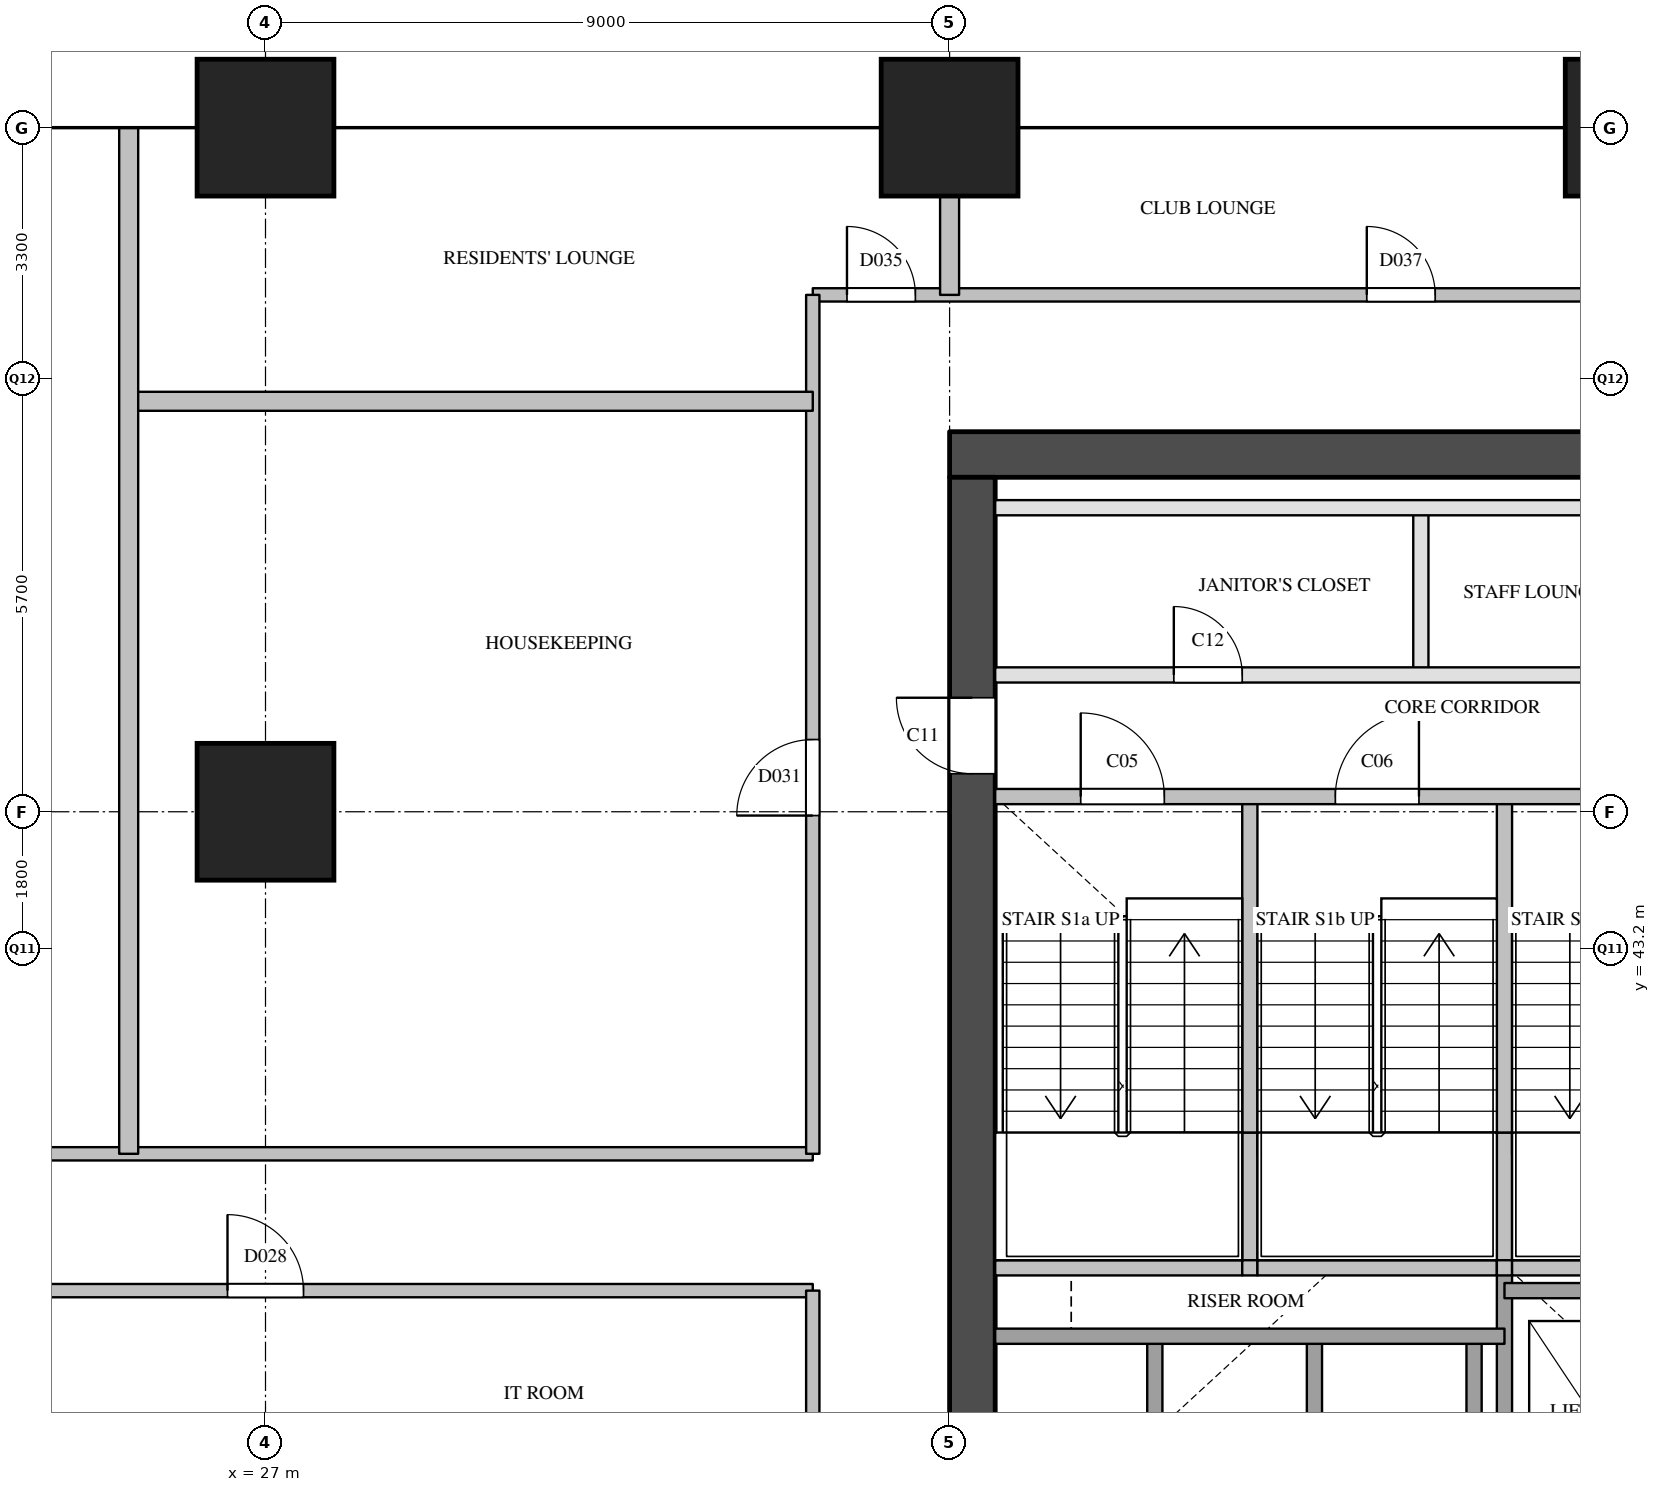
"""IFC4 building model, lengths in metres.
Left out: names, types, materials, properties, quantities, classifications, styles, units other than length and angle.
Written with IfcOpenShell. Run it as: python <this file> out.ifc"""

import sys

from ifc_helpers import new_model, si_unit, direction, frame, frame_2d, origin, origin_2d, place, context, subcontext, project, spatial, rectangle, extrude, element, fill, save


model = new_model("IFC4")
c1 = context("Model", 3, precision=1e-05, world=origin(), true_north=direction((0.0, 1.0)))
c2 = subcontext(c1, "Body", "Model", "MODEL_VIEW")
j1 = project(units=[si_unit("LENGTHUNIT", "METRE"), si_unit("PLANEANGLEUNIT", "RADIAN")], contexts=[c1])
p1 = place(None, origin())
s1 = spatial("IfcSite", under=j1, at=p1, CompositionType="ELEMENT")
p2 = place(p1, origin())
s2 = spatial("IfcBuilding", under=s1, at=p2, CompositionType="ELEMENT")
p3 = place(p2, frame((0.0, 0.0, 112.0)))
s3 = spatial("IfcBuildingStorey", under=s2, at=p3, CompositionType="ELEMENT", Elevation=112.0)
for number, where, z_axis, x_axis in (
    (1, (27.0, 45.0, 0.0), (0.0, 0.0, 1.0), (1.0, 0.0, 0.0)),
    (2, (27.0, 54.0, 0.0), (0.0, 0.0, 1.0), (1.0, 0.0, 0.0)),
    (3, (36.0, 54.0, 0.0), (0.0, 0.0, 1.0), (1.0, 0.0, 0.0)),
    (4, (45.0, 54.0, 0.0), (0.0, 0.0, 1.0), (1.0, 0.0, 0.0)),
):
    element("IfcColumn", number, at=place(p3, frame(where, z_axis=z_axis, x_axis=x_axis)), inside=s3, PredefinedType="COLUMN", context=c2, shape_type="SweptSolid", body=[
        extrude(rectangle(XDim=1.8, YDim=1.8, at=origin_2d()), origin(), (0.0, 0.0, 1.0), 3.8),
    ])
p4 = place(p3, frame((36.0, 49.7, 0.0), z_axis=(0.0, 0.0, 1.0), x_axis=(1.0, 0.0, 0.0)))
e5 = element("IfcWall", 5, at=p4, inside=s3, PredefinedType="SHEAR", context=c2, shape_type="SweptSolid", body=[
    extrude(rectangle(XDim=12.4, YDim=0.6, at=frame_2d((6.2, 0.0))), origin(), (0.0, 0.0, 1.0), 3.5),
])
p5 = place(p3, frame((36.3, 29.1, 0.0), z_axis=(0.0, 0.0, 1.0), x_axis=(0.0, 1.0, 0.0)))
e6 = element("IfcWall", 6, at=p5, inside=s3, PredefinedType="SHEAR", context=c2, shape_type="SweptSolid", body=[
    extrude(rectangle(XDim=20.3, YDim=0.6, at=frame_2d((10.15, 0.0))), origin(), (0.0, 0.0, 1.0), 3.5),
])
p6 = place(p5, frame((3.6, 0.0, 0.0)))
e7 = element("IfcOpeningElement", 7, at=p6, cuts=e6, PredefinedType="OPENING", context=c2, shape_type="SweptSolid", body=[
    extrude(rectangle(XDim=1.8, YDim=2.1, at=frame_2d((0.9, 1.05))), frame((0.0, 0.31, 0.0), z_axis=(0.0, -1.0, 0.0), x_axis=(1.0, 0.0, 0.0)), (0.0, 0.0, 1.0), 0.62),
])
p7 = place(p5, frame((16.4, 0.0, 0.0)))
e8 = element("IfcOpeningElement", 8, at=p7, cuts=e6, PredefinedType="OPENING", context=c2, shape_type="SweptSolid", body=[
    extrude(rectangle(XDim=1.0, YDim=2.1, at=frame_2d((0.5, 1.05))), frame((0.0, 0.31, 0.0), z_axis=(0.0, -1.0, 0.0), x_axis=(1.0, 0.0, 0.0)), (0.0, 0.0, 1.0), 0.62),
])
p8 = place(p3, frame((38.7, 34.9, 0.0), z_axis=(0.0, 0.0, 1.0), x_axis=(0.0, 1.0, 0.0)))
e9 = element("IfcWall", 9, at=p8, inside=s3, PredefinedType="SOLIDWALL", context=c2, shape_type="SweptSolid", body=[
    extrude(rectangle(XDim=3.2, YDim=0.2, at=frame_2d((1.6, 0.0))), origin(), (0.0, 0.0, 1.0), 3.5),
])
p9 = place(p3, frame((39.95, 39.0, 0.0), z_axis=(0.0, 0.0, 1.0), x_axis=(0.0, 1.0, 0.0)))
e10 = element("IfcWall", 10, at=p9, inside=s3, PredefinedType="SOLIDWALL", context=c2, shape_type="SweptSolid", body=[
    extrude(rectangle(XDim=1.78, YDim=0.2, at=frame_2d((0.89, 0.0))), origin(), (0.0, 0.0, 1.0), 3.5),
])
p10 = place(p3, frame((39.95, 40.78, 0.0), z_axis=(0.0, 0.0, 1.0), x_axis=(0.0, 1.0, 0.0)))
e11 = element("IfcWall", 11, at=p10, inside=s3, PredefinedType="SOLIDWALL", context=c2, shape_type="SweptSolid", body=[
    extrude(rectangle(XDim=4.42, YDim=0.2, at=frame_2d((2.21, 0.0))), origin(), (0.0, 0.0, 1.0), 3.5),
])
p11 = place(p3, frame((40.8, 34.9, 0.0), z_axis=(0.0, 0.0, 1.0), x_axis=(0.0, 1.0, 0.0)))
e12 = element("IfcWall", 12, at=p11, inside=s3, PredefinedType="SOLIDWALL", context=c2, shape_type="SweptSolid", body=[
    extrude(rectangle(XDim=3.2, YDim=0.2, at=frame_2d((1.6, 0.0))), origin(), (0.0, 0.0, 1.0), 3.5),
])
p12 = place(p3, frame((42.2, 46.8, 0.0), z_axis=(0.0, 0.0, 1.0), x_axis=(0.0, 1.0, 0.0)))
e13 = element("IfcWall", 13, at=p12, inside=s3, PredefinedType="PARTITIONING", context=c2, shape_type="SweptSolid", body=[
    extrude(rectangle(XDim=2.2, YDim=0.2, at=frame_2d((1.1, 0.0))), origin(), (0.0, 0.0, 1.0), 3.5),
])
p13 = place(p3, frame((42.9, 34.9, 0.0), z_axis=(0.0, 0.0, 1.0), x_axis=(0.0, 1.0, 0.0)))
e14 = element("IfcWall", 14, at=p13, inside=s3, PredefinedType="SOLIDWALL", context=c2, shape_type="SweptSolid", body=[
    extrude(rectangle(XDim=3.2, YDim=0.2, at=frame_2d((1.6, 0.0))), origin(), (0.0, 0.0, 1.0), 3.5),
])
p14 = place(p3, frame((43.3, 29.1, 0.0), z_axis=(0.0, 0.0, 1.0), x_axis=(0.0, 1.0, 0.0)))
e15 = element("IfcWall", 15, at=p14, inside=s3, PredefinedType="SOLIDWALL", context=c2, shape_type="SweptSolid", body=[
    extrude(rectangle(XDim=9.9, YDim=0.2, at=frame_2d((4.95, 0.0))), origin(), (0.0, 0.0, 1.0), 3.5),
])
p15 = place(p3, frame((43.3, 39.0, 0.0), z_axis=(0.0, 0.0, 1.0), x_axis=(0.0, 1.0, 0.0)))
e16 = element("IfcWall", 16, at=p15, inside=s3, PredefinedType="SOLIDWALL", context=c2, shape_type="SweptSolid", body=[
    extrude(rectangle(XDim=1.78, YDim=0.2, at=frame_2d((0.89, 0.0))), origin(), (0.0, 0.0, 1.0), 3.5),
])
p16 = place(p3, frame((43.3, 40.78, 0.0), z_axis=(0.0, 0.0, 1.0), x_axis=(0.0, 1.0, 0.0)))
e17 = element("IfcWall", 17, at=p16, inside=s3, PredefinedType="SOLIDWALL", context=c2, shape_type="SweptSolid", body=[
    extrude(rectangle(XDim=4.42, YDim=0.2, at=frame_2d((2.21, 0.0))), origin(), (0.0, 0.0, 1.0), 3.5),
])
p17 = place(p3, frame((36.6, 38.1, 0.0), z_axis=(0.0, 0.0, 1.0), x_axis=(1.0, 0.0, 0.0)))
e18 = element("IfcWall", 18, at=p17, inside=s3, PredefinedType="SOLIDWALL", context=c2, shape_type="SweptSolid", body=[
    extrude(rectangle(XDim=6.7, YDim=0.2, at=frame_2d((3.35, 0.0))), origin(), (0.0, 0.0, 1.0), 3.5),
])
p18 = place(p3, frame((43.3, 38.7, 0.0), z_axis=(0.0, 0.0, 1.0), x_axis=(1.0, 0.0, 0.0)))
e19 = element("IfcWall", 19, at=p18, inside=s3, PredefinedType="SOLIDWALL", context=c2, shape_type="SweptSolid", body=[
    extrude(rectangle(XDim=4.5, YDim=0.2, at=frame_2d((2.25, 0.0))), origin(), (0.0, 0.0, 1.0), 3.5),
])
p19 = place(p3, frame((36.6, 39.0, 0.0), z_axis=(0.0, 0.0, 1.0), x_axis=(1.0, 0.0, 0.0)))
e20 = element("IfcWall", 20, at=p19, inside=s3, PredefinedType="SOLIDWALL", context=c2, shape_type="SweptSolid", body=[
    extrude(rectangle(XDim=3.25, YDim=0.2, at=frame_2d((1.625, 0.0))), origin(), (0.0, 0.0, 1.0), 3.5),
])
p20 = place(p3, frame((39.85, 39.0, 0.0), z_axis=(0.0, 0.0, 1.0), x_axis=(1.0, 0.0, 0.0)))
e21 = element("IfcWall", 21, at=p20, inside=s3, PredefinedType="SOLIDWALL", context=c2, shape_type="SweptSolid", body=[
    extrude(rectangle(XDim=0.2, YDim=0.2, at=frame_2d((0.1, 0.0))), origin(), (0.0, 0.0, 1.0), 3.5),
])
p21 = place(p3, frame((40.05, 39.0, 0.0), z_axis=(0.0, 0.0, 1.0), x_axis=(1.0, 0.0, 0.0)))
e22 = element("IfcWall", 22, at=p21, inside=s3, PredefinedType="SOLIDWALL", context=c2, shape_type="SweptSolid", body=[
    extrude(rectangle(XDim=3.15, YDim=0.2, at=frame_2d((1.575, 0.0))), origin(), (0.0, 0.0, 1.0), 3.5),
])
p22 = place(p3, frame((43.2, 39.0, 0.0), z_axis=(0.0, 0.0, 1.0), x_axis=(1.0, 0.0, 0.0)))
e23 = element("IfcWall", 23, at=p22, inside=s3, PredefinedType="SOLIDWALL", context=c2, shape_type="SweptSolid", body=[
    extrude(rectangle(XDim=0.2, YDim=0.2, at=frame_2d((0.1, 0.0))), origin(), (0.0, 0.0, 1.0), 3.5),
])
p23 = place(p3, frame((43.4, 39.0, 0.0), z_axis=(0.0, 0.0, 1.0), x_axis=(1.0, 0.0, 0.0)))
e24 = element("IfcWall", 24, at=p23, inside=s3, PredefinedType="SOLIDWALL", context=c2, shape_type="SweptSolid", body=[
    extrude(rectangle(XDim=3.25, YDim=0.2, at=frame_2d((1.625, 0.0))), origin(), (0.0, 0.0, 1.0), 3.5),
])
p24 = place(p3, frame((36.6, 45.2, 0.0), z_axis=(0.0, 0.0, 1.0), x_axis=(1.0, 0.0, 0.0)))
e25 = element("IfcWall", 25, at=p24, inside=s3, PredefinedType="SOLIDWALL", context=c2, shape_type="SweptSolid", body=[
    extrude(rectangle(XDim=10.05, YDim=0.2, at=frame_2d((5.025, 0.0))), origin(), (0.0, 0.0, 1.0), 3.5),
])
p25 = place(p24, frame((1.125, 0.0, 0.0)))
e26 = element("IfcOpeningElement", 26, at=p25, cuts=e25, PredefinedType="OPENING", context=c2, shape_type="SweptSolid", body=[
    extrude(rectangle(XDim=1.1, YDim=2.1, at=frame_2d((0.55, 1.05))), frame((0.0, 0.11, 0.0), z_axis=(0.0, -1.0, 0.0), x_axis=(1.0, 0.0, 0.0)), (0.0, 0.0, 1.0), 0.22),
])
p26 = place(p24, frame((4.475, 0.0, 0.0)))
e27 = element("IfcOpeningElement", 27, at=p26, cuts=e25, PredefinedType="OPENING", context=c2, shape_type="SweptSolid", body=[
    extrude(rectangle(XDim=1.1, YDim=2.1, at=frame_2d((0.55, 1.05))), frame((0.0, 0.11, 0.0), z_axis=(0.0, -1.0, 0.0), x_axis=(1.0, 0.0, 0.0)), (0.0, 0.0, 1.0), 0.22),
])
p27 = place(p24, frame((7.825, 0.0, 0.0)))
e28 = element("IfcOpeningElement", 28, at=p27, cuts=e25, PredefinedType="OPENING", context=c2, shape_type="SweptSolid", body=[
    extrude(rectangle(XDim=1.1, YDim=2.1, at=frame_2d((0.55, 1.05))), frame((0.0, 0.11, 0.0), z_axis=(0.0, -1.0, 0.0), x_axis=(1.0, 0.0, 0.0)), (0.0, 0.0, 1.0), 0.22),
])
p28 = place(p3, frame((36.6, 46.8, 0.0), z_axis=(0.0, 0.0, 1.0), x_axis=(1.0, 0.0, 0.0)))
e29 = element("IfcWall", 29, at=p28, inside=s3, PredefinedType="PARTITIONING", context=c2, shape_type="SweptSolid", body=[
    extrude(rectangle(XDim=11.2, YDim=0.2, at=frame_2d((5.6, 0.0))), origin(), (0.0, 0.0, 1.0), 3.5),
])
p29 = place(p28, frame((2.35, 0.0, 0.0)))
e30 = element("IfcOpeningElement", 30, at=p29, cuts=e29, PredefinedType="OPENING", context=c2, shape_type="SweptSolid", body=[
    extrude(rectangle(XDim=0.9, YDim=2.1, at=frame_2d((0.45, 1.05))), frame((0.0, 0.11, 0.0), z_axis=(0.0, -1.0, 0.0), x_axis=(1.0, 0.0, 0.0)), (0.0, 0.0, 1.0), 0.22),
])
p30 = place(p28, frame((7.95, 0.0, 0.0)))
e31 = element("IfcOpeningElement", 31, at=p30, cuts=e29, PredefinedType="OPENING", context=c2, shape_type="SweptSolid", body=[
    extrude(rectangle(XDim=0.9, YDim=2.1, at=frame_2d((0.45, 1.05))), frame((0.0, 0.11, 0.0), z_axis=(0.0, -1.0, 0.0), x_axis=(1.0, 0.0, 0.0)), (0.0, 0.0, 1.0), 0.22),
])
p31 = place(p3, frame((36.6, 49.0, 0.0), z_axis=(0.0, 0.0, 1.0), x_axis=(1.0, 0.0, 0.0)))
e32 = element("IfcWall", 32, at=p31, inside=s3, PredefinedType="PARTITIONING", context=c2, shape_type="SweptSolid", body=[
    extrude(rectangle(XDim=11.2, YDim=0.2, at=frame_2d((5.6, 0.0))), origin(), (0.0, 0.0, 1.0), 3.5),
])
p32 = place(p3, frame((19.8, 38.7, 0.0), z_axis=(0.0, 0.0, 1.0), x_axis=(1.0, 0.0, 0.0)))
e33 = element("IfcWall", 33, at=p32, inside=s3, PredefinedType="PARTITIONING", context=c2, shape_type="SweptSolid", body=[
    extrude(rectangle(XDim=14.4, YDim=0.175, at=frame_2d((7.2, 0.0))), origin(), (0.0, 0.0, 1.0), 2.5),
])
p33 = place(p32, frame((6.7, 0.0, 0.0)))
e34 = element("IfcOpeningElement", 34, at=p33, cuts=e33, PredefinedType="OPENING", context=c2, shape_type="SweptSolid", body=[
    extrude(rectangle(XDim=1.0, YDim=2.1, at=frame_2d((0.5, 1.05))), frame((0.0, 0.097, 0.0), z_axis=(0.0, -1.0, 0.0), x_axis=(1.0, 0.0, 0.0)), (0.0, 0.0, 1.0), 0.195),
])
p34 = place(p3, frame((19.8, 40.5, 0.0), z_axis=(0.0, 0.0, 1.0), x_axis=(1.0, 0.0, 0.0)))
e35 = element("IfcWall", 35, at=p34, inside=s3, PredefinedType="PARTITIONING", context=c2, shape_type="SweptSolid", body=[
    extrude(rectangle(XDim=14.4, YDim=0.175, at=frame_2d((7.2, 0.0))), origin(), (0.0, 0.0, 1.0), 2.5),
])
p35 = place(p3, frame((34.2, 51.8, 0.0), z_axis=(0.0, 0.0, 1.0), x_axis=(1.0, 0.0, 0.0)))
e36 = element("IfcWall", 36, at=p35, inside=s3, PredefinedType="PARTITIONING", context=c2, shape_type="SweptSolid", body=[
    extrude(rectangle(XDim=16.0, YDim=0.175, at=frame_2d((8.0, 0.0))), origin(), (0.0, 0.0, 1.0), 3.5),
])
p36 = place(p35, frame((0.45, 0.0, 0.0)))
e37 = element("IfcOpeningElement", 37, at=p36, cuts=e36, PredefinedType="OPENING", context=c2, shape_type="SweptSolid", body=[
    extrude(rectangle(XDim=0.9, YDim=2.1, at=frame_2d((0.45, 1.05))), frame((0.0, 0.097, 0.0), z_axis=(0.0, -1.0, 0.0), x_axis=(1.0, 0.0, 0.0)), (0.0, 0.0, 1.0), 0.195),
])
p37 = place(p35, frame((7.289, 0.0, 0.0)))
e38 = element("IfcOpeningElement", 38, at=p37, cuts=e36, PredefinedType="OPENING", context=c2, shape_type="SweptSolid", body=[
    extrude(rectangle(XDim=0.9, YDim=2.1, at=frame_2d((0.45, 1.05))), frame((0.0, 0.097, 0.0), z_axis=(0.0, -1.0, 0.0), x_axis=(1.0, 0.0, 0.0)), (0.0, 0.0, 1.0), 0.195),
])
p38 = place(p3, frame((34.2, 29.12, 0.0), z_axis=(0.0, 0.0, 1.0), x_axis=(0.0, 1.0, 0.0)))
e39 = element("IfcWall", 39, at=p38, inside=s3, PredefinedType="PARTITIONING", context=c2, shape_type="SweptSolid", body=[
    extrude(rectangle(XDim=9.58, YDim=0.175, at=frame_2d((4.79, 0.0))), origin(), (0.0, 0.0, 1.0), 3.5),
])
p39 = place(p38, frame((2.94, 0.0, 0.0)))
e40 = element("IfcOpeningElement", 40, at=p39, cuts=e39, PredefinedType="OPENING", context=c2, shape_type="SweptSolid", body=[
    extrude(rectangle(XDim=1.0, YDim=2.1, at=frame_2d((0.5, 1.05))), frame((0.0, 0.097, 0.0), z_axis=(0.0, -1.0, 0.0), x_axis=(1.0, 0.0, 0.0)), (0.0, 0.0, 1.0), 0.195),
])
p40 = place(p3, frame((34.2, 40.5, 0.0), z_axis=(0.0, 0.0, 1.0), x_axis=(0.0, 1.0, 0.0)))
e41 = element("IfcWall", 41, at=p40, inside=s3, PredefinedType="PARTITIONING", context=c2, shape_type="SweptSolid", body=[
    extrude(rectangle(XDim=11.3, YDim=0.175, at=frame_2d((5.65, 0.0))), origin(), (0.0, 0.0, 1.0), 3.5),
])
p41 = place(p40, frame((4.45, 0.0, 0.0)))
e42 = element("IfcOpeningElement", 42, at=p41, cuts=e41, PredefinedType="OPENING", context=c2, shape_type="SweptSolid", body=[
    extrude(rectangle(XDim=1.0, YDim=2.1, at=frame_2d((0.5, 1.05))), frame((0.0, 0.097, 0.0), z_axis=(0.0, -1.0, 0.0), x_axis=(1.0, 0.0, 0.0)), (0.0, 0.0, 1.0), 0.195),
])
p42 = place(p3, frame((25.2, 50.4, 0.0), z_axis=(0.0, 0.0, 1.0), x_axis=(1.0, 0.0, 0.0)))
e43 = element("IfcWall", 43, at=p42, inside=s3, PredefinedType="PARTITIONING", context=c2, shape_type="SweptSolid", body=[
    extrude(rectangle(XDim=9.0, YDim=0.25, at=frame_2d((4.5, 0.0))), origin(), (0.0, 0.0, 1.0), 2.5),
])
p43 = place(p3, frame((25.2, 40.5, 0.0), z_axis=(0.0, 0.0, 1.0), x_axis=(0.0, 1.0, 0.0)))
e44 = element("IfcWall", 44, at=p43, inside=s3, PredefinedType="PARTITIONING", context=c2, shape_type="SweptSolid", body=[
    extrude(rectangle(XDim=13.5, YDim=0.25, at=frame_2d((6.75, 0.0))), origin(), (0.0, 0.0, 1.0), 2.5),
])
p44 = place(p3, frame((36.0, 51.8, 0.0), z_axis=(0.0, 0.0, 1.0), x_axis=(0.0, 1.0, 0.0)))
e45 = element("IfcWall", 45, at=p44, inside=s3, PredefinedType="PARTITIONING", context=c2, shape_type="SweptSolid", body=[
    extrude(rectangle(XDim=2.2, YDim=0.25, at=frame_2d((1.1, 0.0))), origin(), (0.0, 0.0, 1.0), 3.5),
])
p45 = place(p25, origin())
e46 = element("IfcDoor", 46, at=p45, inside=s3, OperationType="SINGLE_SWING_LEFT", PredefinedType="DOOR", context=c2, shape_type="SweptSolid", body=[
    extrude(rectangle(XDim=1.1, YDim=2.1, at=frame_2d((0.55, 1.05))), frame((0.0, 0.025, 0.0), z_axis=(0.0, -1.0, 0.0), x_axis=(1.0, 0.0, 0.0)), (0.0, 0.0, 1.0), 0.05),
])
fill(e26, e46)
p46 = place(p26, origin())
e47 = element("IfcDoor", 47, at=p46, inside=s3, OperationType="SINGLE_SWING_RIGHT", PredefinedType="DOOR", context=c2, shape_type="SweptSolid", body=[
    extrude(rectangle(XDim=1.1, YDim=2.1, at=frame_2d((0.55, 1.05))), frame((0.0, 0.025, 0.0), z_axis=(0.0, -1.0, 0.0), x_axis=(1.0, 0.0, 0.0)), (0.0, 0.0, 1.0), 0.05),
])
fill(e27, e47)
p47 = place(p7, origin())
e48 = element("IfcDoor", 48, at=p47, inside=s3, OperationType="SINGLE_SWING_RIGHT", PredefinedType="DOOR", context=c2, shape_type="SweptSolid", body=[
    extrude(rectangle(XDim=1.0, YDim=2.1, at=frame_2d((0.5, 1.05))), frame((0.0, 0.025, 0.0), z_axis=(0.0, -1.0, 0.0), x_axis=(1.0, 0.0, 0.0)), (0.0, 0.0, 1.0), 0.05),
])
fill(e8, e48)
p48 = place(p29, origin())
e49 = element("IfcDoor", 49, at=p48, inside=s3, OperationType="SINGLE_SWING_LEFT", PredefinedType="DOOR", context=c2, shape_type="SweptSolid", body=[
    extrude(rectangle(XDim=0.9, YDim=2.1, at=frame_2d((0.45, 1.05))), frame((0.0, 0.025, 0.0), z_axis=(0.0, -1.0, 0.0), x_axis=(1.0, 0.0, 0.0)), (0.0, 0.0, 1.0), 0.05),
])
fill(e30, e49)
p49 = place(p33, origin())
e50 = element("IfcDoor", 50, at=p49, inside=s3, OperationType="SINGLE_SWING_LEFT", PredefinedType="DOOR", context=c2, shape_type="SweptSolid", body=[
    extrude(rectangle(XDim=1.0, YDim=2.1, at=frame_2d((0.5, 1.05))), frame((0.0, 0.025, 0.0), z_axis=(0.0, -1.0, 0.0), x_axis=(1.0, 0.0, 0.0)), (0.0, 0.0, 1.0), 0.05),
])
fill(e34, e50)
p50 = place(p41, origin())
e51 = element("IfcDoor", 51, at=p50, inside=s3, OperationType="SINGLE_SWING_LEFT", PredefinedType="DOOR", context=c2, shape_type="SweptSolid", body=[
    extrude(rectangle(XDim=1.0, YDim=2.1, at=frame_2d((0.5, 1.05))), frame((0.0, 0.025, 0.0), z_axis=(0.0, -1.0, 0.0), x_axis=(1.0, 0.0, 0.0)), (0.0, 0.0, 1.0), 0.05),
])
fill(e42, e51)
p51 = place(p36, origin())
e52 = element("IfcDoor", 52, at=p51, inside=s3, OperationType="SINGLE_SWING_LEFT", PredefinedType="DOOR", context=c2, shape_type="SweptSolid", body=[
    extrude(rectangle(XDim=0.9, YDim=2.1, at=frame_2d((0.45, 1.05))), frame((0.0, 0.025, 0.0), z_axis=(0.0, -1.0, 0.0), x_axis=(1.0, 0.0, 0.0)), (0.0, 0.0, 1.0), 0.05),
])
fill(e37, e52)
p52 = place(p37, origin())
e53 = element("IfcDoor", 53, at=p52, inside=s3, OperationType="SINGLE_SWING_LEFT", PredefinedType="DOOR", context=c2, shape_type="SweptSolid", body=[
    extrude(rectangle(XDim=0.9, YDim=2.1, at=frame_2d((0.45, 1.05))), frame((0.0, 0.025, 0.0), z_axis=(0.0, -1.0, 0.0), x_axis=(1.0, 0.0, 0.0)), (0.0, 0.0, 1.0), 0.05),
])
fill(e38, e53)
save(model, sys.argv[1])
